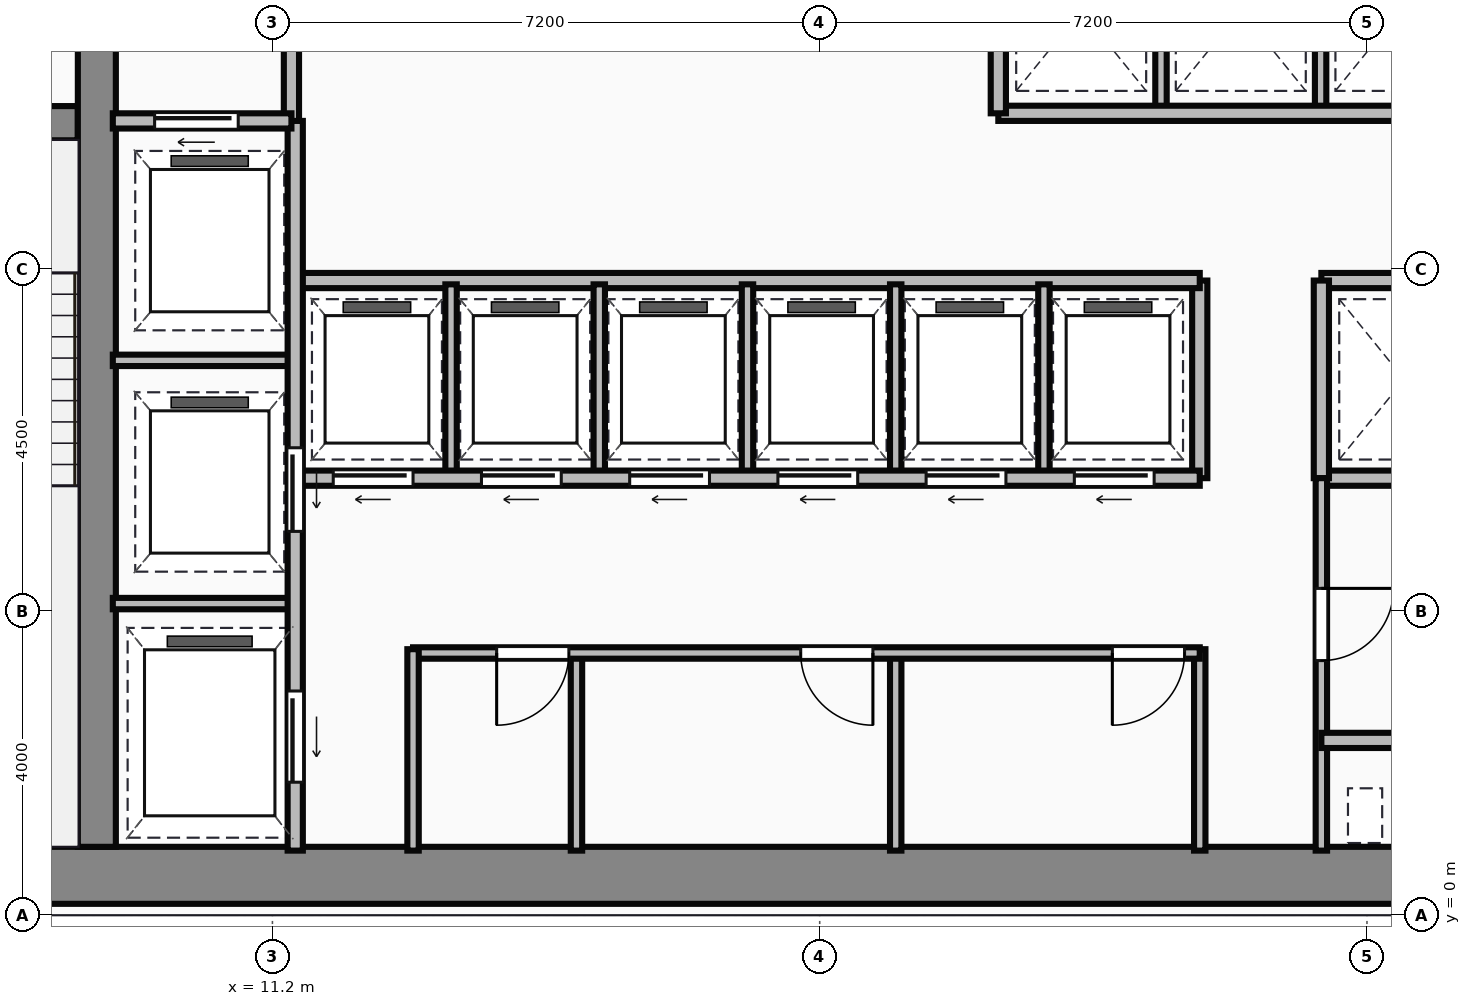
"""IFC4 building model, lengths in metres.
Left out: names, types, materials, properties, quantities, classifications, styles, units other than length and angle.
Written with IfcOpenShell. Run it as: python <this file> out.ifc"""

import sys

from ifc_helpers import new_model, si_unit, direction, frame, frame_2d, origin, place, context, subcontext, project, spatial, rectangle, extrude, source, transform, mapped, element, fill, save


model = new_model("IFC4")
c1 = context("Model", 3, precision=1e-05, world=origin(), true_north=direction((0.0, 1.0)))
c2 = subcontext(c1, "Body", "Model", "MODEL_VIEW")
j1 = project(units=[si_unit("LENGTHUNIT", "METRE"), si_unit("PLANEANGLEUNIT", "RADIAN")], contexts=[c1])
p1 = place(None, origin())
s1 = spatial("IfcSite", under=j1, at=p1, CompositionType="ELEMENT")
p2 = place(p1, origin())
s2 = spatial("IfcBuilding", under=s1, at=p2, CompositionType="ELEMENT")
p3 = place(p2, frame((0.0, 0.0, 99.6)))
s3 = spatial("IfcBuildingStorey", under=s2, at=p3, CompositionType="ELEMENT", Elevation=99.6)
m1 = source(origin(), c2, "Body", "SweptSolid", [
    extrude(rectangle(XDim=29.5, YDim=0.75, at=frame_2d((14.75, 0.0))), origin(), (0.0, 0.0, 1.0), 3.65),
])
p4 = place(p3, frame((4.5, 0.525, 0.0), z_axis=(0.0, 0.0, 1.0), x_axis=(1.0, 0.0, 0.0)))
e1 = element("IfcWall", 1, at=p4, inside=s3, PredefinedType="SHEAR", context=c2, shape_type="MappedRepresentation", body=[
    mapped(m1, transform((0.0, 0.0, 0.0))),
])
m2 = source(origin(), c2, "Body", "SweptSolid", [
    extrude(rectangle(XDim=12.35, YDim=0.5, at=frame_2d((6.175, 0.0))), origin(), (0.0, 0.0, 1.0), 3.65),
])
p5 = place(p3, frame((8.89, 0.9, 0.0), z_axis=(0.0, 0.0, 1.0), x_axis=(0.0, 1.0, 0.0)))
e2 = element("IfcWall", 2, at=p5, inside=s3, PredefinedType="SHEAR", context=c2, shape_type="MappedRepresentation", body=[
    mapped(m2, transform((0.0, 0.0, 0.0))),
])
m3 = source(origin(), c2, "Body", "SweptSolid", [
    extrude(rectangle(XDim=3.39, YDim=0.45, at=frame_2d((1.695, 0.0))), origin(), (0.0, 0.0, 1.0), 3.65),
])
p6 = place(p3, frame((5.25, 10.42, 0.0), z_axis=(0.0, 0.0, 1.0), x_axis=(1.0, 0.0, 0.0)))
e3 = element("IfcWall", 3, at=p6, inside=s3, PredefinedType="SHEAR", context=c2, shape_type="MappedRepresentation", body=[
    mapped(m3, transform((0.0, 0.0, 0.0))),
])
p7 = place(p6, frame((1.05, 0.0, 0.0)))
e4 = element("IfcOpeningElement", 4, at=p7, cuts=e3, PredefinedType="OPENING", context=c2, shape_type="SweptSolid", body=[
    extrude(rectangle(XDim=1.1, YDim=2.15, at=frame_2d((0.55, 1.075))), frame((0.0, 0.235, 0.0), z_axis=(0.0, -1.0, 0.0), x_axis=(1.0, 0.0, 0.0)), (0.0, 0.0, 1.0), 0.47),
])
m4 = source(origin(), c2, "Body", "SweptSolid", [
    extrude(rectangle(XDim=3.18, YDim=0.2, at=frame_2d((1.59, 0.0))), origin(), (0.0, 0.0, 1.0), 3.4),
])
p8 = place(p3, frame((11.45, 10.42, 0.0), z_axis=(0.0, 0.0, 1.0), x_axis=(0.0, 1.0, 0.0)))
e5 = element("IfcWall", 5, at=p8, inside=s3, PredefinedType="PARTITIONING", context=c2, shape_type="MappedRepresentation", body=[
    mapped(m4, transform((0.0, 0.0, 0.0))),
])
m5 = source(origin(), c2, "Body", "SweptSolid", [
    extrude(rectangle(XDim=2.35, YDim=0.2, at=frame_2d((1.175, 0.0))), origin(), (0.0, 0.0, 1.0), 3.4),
])
p9 = place(p3, frame((9.1, 10.45, 0.0), z_axis=(0.0, 0.0, 1.0), x_axis=(1.0, 0.0, 0.0)))
e6 = element("IfcWall", 6, at=p9, inside=s3, PredefinedType="PARTITIONING", context=c2, shape_type="MappedRepresentation", body=[
    mapped(m5, transform((0.0, 0.0, 0.0))),
])
p10 = place(p9, frame((0.55, 0.0, 0.0)))
e7 = element("IfcOpeningElement", 7, at=p10, cuts=e6, PredefinedType="OPENING", context=c2, shape_type="SweptSolid", body=[
    extrude(rectangle(XDim=1.1, YDim=2.15, at=frame_2d((0.55, 1.075))), frame((0.0, 0.11, 0.0), z_axis=(0.0, -1.0, 0.0), x_axis=(1.0, 0.0, 0.0)), (0.0, 0.0, 1.0), 0.22),
])
m6 = source(origin(), c2, "Body", "SweptSolid", [
    extrude(rectangle(XDim=9.6, YDim=0.2, at=frame_2d((4.8, 0.0))), origin(), (0.0, 0.0, 1.0), 3.4),
])
p11 = place(p3, frame((11.5, 0.85, 0.0), z_axis=(0.0, 0.0, 1.0), x_axis=(0.0, 1.0, 0.0)))
e8 = element("IfcWall", 8, at=p11, inside=s3, PredefinedType="PARTITIONING", context=c2, shape_type="MappedRepresentation", body=[
    mapped(m6, transform((0.0, 0.0, 0.0))),
])
p12 = place(p11, frame((4.2, 0.0, 0.0)))
e9 = element("IfcOpeningElement", 9, at=p12, cuts=e8, PredefinedType="OPENING", context=c2, shape_type="SweptSolid", body=[
    extrude(rectangle(XDim=1.1, YDim=2.15, at=frame_2d((0.55, 1.075))), frame((0.0, 0.11, 0.0), z_axis=(0.0, -1.0, 0.0), x_axis=(1.0, 0.0, 0.0)), (0.0, 0.0, 1.0), 0.22),
])
p13 = place(p11, frame((0.9, 0.0, 0.0)))
e10 = element("IfcOpeningElement", 10, at=p13, cuts=e8, PredefinedType="OPENING", context=c2, shape_type="SweptSolid", body=[
    extrude(rectangle(XDim=1.2, YDim=2.15, at=frame_2d((0.6, 1.075))), frame((0.0, 0.11, 0.0), z_axis=(0.0, -1.0, 0.0), x_axis=(1.0, 0.0, 0.0)), (0.0, 0.0, 1.0), 0.22),
])
m7 = source(origin(), c2, "Body", "SweptSolid", [
    extrude(rectangle(XDim=2.4, YDim=0.15, at=frame_2d((1.2, 0.0))), origin(), (0.0, 0.0, 1.0), 3.4),
])
for number, where, z_axis, x_axis in (
    (11, (9.1, 4.1, 0.0), (0.0, 0.0, 1.0), (1.0, 0.0, 0.0)),
    (12, (9.1, 7.3, 0.0), (0.0, 0.0, 1.0), (1.0, 0.0, 0.0)),
):
    element("IfcWall", number, at=place(p3, frame(where, z_axis=z_axis, x_axis=x_axis)), inside=s3, PredefinedType="PARTITIONING", context=c2, shape_type="MappedRepresentation", body=[
        mapped(m7, transform((0.0, 0.0, 0.0))),
    ])
m8 = source(origin(), c2, "Body", "SweptSolid", [
    extrude(rectangle(XDim=2.65, YDim=0.15, at=frame_2d((1.325, 0.0))), origin(), (0.0, 0.0, 1.0), 3.4),
])
p14 = place(p3, frame((13.05, 0.85, 0.0), z_axis=(0.0, 0.0, 1.0), x_axis=(0.0, 1.0, 0.0)))
e13 = element("IfcWall", 13, at=p14, inside=s3, PredefinedType="PARTITIONING", context=c2, shape_type="MappedRepresentation", body=[
    mapped(m8, transform((0.0, 0.0, 0.0))),
])
m9 = source(origin(), c2, "Body", "SweptSolid", [
    extrude(rectangle(XDim=10.35, YDim=0.15, at=frame_2d((5.175, 0.0))), origin(), (0.0, 0.0, 1.0), 3.4),
])
p15 = place(p3, frame((13.05, 3.45, 0.0), z_axis=(0.0, 0.0, 1.0), x_axis=(1.0, 0.0, 0.0)))
e14 = element("IfcWall", 14, at=p15, inside=s3, PredefinedType="PARTITIONING", context=c2, shape_type="MappedRepresentation", body=[
    mapped(m9, transform((0.0, 0.0, 0.0))),
])
p16 = place(p15, frame((1.1, 0.0, 0.0)))
e15 = element("IfcOpeningElement", 15, at=p16, cuts=e14, PredefinedType="OPENING", context=c2, shape_type="SweptSolid", body=[
    extrude(rectangle(XDim=0.95, YDim=2.15, at=frame_2d((0.475, 1.075))), frame((0.0, 0.085, 0.0), z_axis=(0.0, -1.0, 0.0), x_axis=(1.0, 0.0, 0.0)), (0.0, 0.0, 1.0), 0.17),
])
p17 = place(p15, frame((5.1, 0.0, 0.0)))
e16 = element("IfcOpeningElement", 16, at=p17, cuts=e14, PredefinedType="OPENING", context=c2, shape_type="SweptSolid", body=[
    extrude(rectangle(XDim=0.95, YDim=2.15, at=frame_2d((0.475, 1.075))), frame((0.0, 0.085, 0.0), z_axis=(0.0, -1.0, 0.0), x_axis=(1.0, 0.0, 0.0)), (0.0, 0.0, 1.0), 0.17),
])
p18 = place(p15, frame((9.2, 0.0, 0.0)))
e17 = element("IfcOpeningElement", 17, at=p18, cuts=e14, PredefinedType="OPENING", context=c2, shape_type="SweptSolid", body=[
    extrude(rectangle(XDim=0.95, YDim=2.15, at=frame_2d((0.475, 1.075))), frame((0.0, 0.085, 0.0), z_axis=(0.0, -1.0, 0.0), x_axis=(1.0, 0.0, 0.0)), (0.0, 0.0, 1.0), 0.17),
])
p19 = place(p3, frame((23.4, 0.85, 0.0), z_axis=(0.0, 0.0, 1.0), x_axis=(0.0, 1.0, 0.0)))
e18 = element("IfcWall", 18, at=p19, inside=s3, PredefinedType="PARTITIONING", context=c2, shape_type="MappedRepresentation", body=[
    mapped(m8, transform((0.0, 0.0, 0.0))),
])
m10 = source(origin(), c2, "Body", "SweptSolid", [
    extrude(rectangle(XDim=2.6, YDim=0.15, at=frame_2d((1.3, 0.0))), origin(), (0.0, 0.0, 1.0), 3.4),
])
for number, where, z_axis, x_axis in (
    (19, (15.2, 0.85, 0.0), (0.0, 0.0, 1.0), (0.0, 1.0, 0.0)),
    (20, (19.4, 0.85, 0.0), (0.0, 0.0, 1.0), (0.0, 1.0, 0.0)),
):
    element("IfcWall", number, at=place(p3, frame(where, z_axis=z_axis, x_axis=x_axis)), inside=s3, PredefinedType="PARTITIONING", context=c2, shape_type="MappedRepresentation", body=[
        mapped(m10, transform((0.0, 0.0, 0.0))),
    ])
m11 = source(origin(), c2, "Body", "SweptSolid", [
    extrude(rectangle(XDim=11.85, YDim=0.2, at=frame_2d((5.925, 0.0))), origin(), (0.0, 0.0, 1.0), 3.4),
])
p20 = place(p3, frame((11.55, 5.75, 0.0), z_axis=(0.0, 0.0, 1.0), x_axis=(1.0, 0.0, 0.0)))
e21 = element("IfcWall", 21, at=p20, inside=s3, PredefinedType="PARTITIONING", context=c2, shape_type="MappedRepresentation", body=[
    mapped(m11, transform((0.0, 0.0, 0.0))),
])
p21 = place(p20, frame((0.45, 0.0, 0.0)))
e22 = element("IfcOpeningElement", 22, at=p21, cuts=e21, PredefinedType="OPENING", context=c2, shape_type="SweptSolid", body=[
    extrude(rectangle(XDim=1.05, YDim=2.15, at=frame_2d((0.525, 1.075))), frame((0.0, 0.11, 0.0), z_axis=(0.0, -1.0, 0.0), x_axis=(1.0, 0.0, 0.0)), (0.0, 0.0, 1.0), 0.22),
])
p22 = place(p20, frame((2.4, 0.0, 0.0)))
e23 = element("IfcOpeningElement", 23, at=p22, cuts=e21, PredefinedType="OPENING", context=c2, shape_type="SweptSolid", body=[
    extrude(rectangle(XDim=1.05, YDim=2.15, at=frame_2d((0.525, 1.075))), frame((0.0, 0.11, 0.0), z_axis=(0.0, -1.0, 0.0), x_axis=(1.0, 0.0, 0.0)), (0.0, 0.0, 1.0), 0.22),
])
p23 = place(p20, frame((4.35, 0.0, 0.0)))
e24 = element("IfcOpeningElement", 24, at=p23, cuts=e21, PredefinedType="OPENING", context=c2, shape_type="SweptSolid", body=[
    extrude(rectangle(XDim=1.05, YDim=2.15, at=frame_2d((0.525, 1.075))), frame((0.0, 0.11, 0.0), z_axis=(0.0, -1.0, 0.0), x_axis=(1.0, 0.0, 0.0)), (0.0, 0.0, 1.0), 0.22),
])
p24 = place(p20, frame((6.3, 0.0, 0.0)))
e25 = element("IfcOpeningElement", 25, at=p24, cuts=e21, PredefinedType="OPENING", context=c2, shape_type="SweptSolid", body=[
    extrude(rectangle(XDim=1.05, YDim=2.15, at=frame_2d((0.525, 1.075))), frame((0.0, 0.11, 0.0), z_axis=(0.0, -1.0, 0.0), x_axis=(1.0, 0.0, 0.0)), (0.0, 0.0, 1.0), 0.22),
])
p25 = place(p20, frame((8.25, 0.0, 0.0)))
e26 = element("IfcOpeningElement", 26, at=p25, cuts=e21, PredefinedType="OPENING", context=c2, shape_type="SweptSolid", body=[
    extrude(rectangle(XDim=1.05, YDim=2.15, at=frame_2d((0.525, 1.075))), frame((0.0, 0.11, 0.0), z_axis=(0.0, -1.0, 0.0), x_axis=(1.0, 0.0, 0.0)), (0.0, 0.0, 1.0), 0.22),
])
p26 = place(p20, frame((10.2, 0.0, 0.0)))
e27 = element("IfcOpeningElement", 27, at=p26, cuts=e21, PredefinedType="OPENING", context=c2, shape_type="SweptSolid", body=[
    extrude(rectangle(XDim=1.05, YDim=2.15, at=frame_2d((0.525, 1.075))), frame((0.0, 0.11, 0.0), z_axis=(0.0, -1.0, 0.0), x_axis=(1.0, 0.0, 0.0)), (0.0, 0.0, 1.0), 0.22),
])
p27 = place(p3, frame((11.55, 8.35, 0.0), z_axis=(0.0, 0.0, 1.0), x_axis=(1.0, 0.0, 0.0)))
e28 = element("IfcWall", 28, at=p27, inside=s3, PredefinedType="PARTITIONING", context=c2, shape_type="MappedRepresentation", body=[
    mapped(m11, transform((0.0, 0.0, 0.0))),
])
m12 = source(origin(), c2, "Body", "SweptSolid", [
    extrude(rectangle(XDim=2.6, YDim=0.2, at=frame_2d((1.3, 0.0))), origin(), (0.0, 0.0, 1.0), 3.4),
])
p28 = place(p3, frame((23.4, 5.75, 0.0), z_axis=(0.0, 0.0, 1.0), x_axis=(0.0, 1.0, 0.0)))
e29 = element("IfcWall", 29, at=p28, inside=s3, PredefinedType="PARTITIONING", context=c2, shape_type="MappedRepresentation", body=[
    mapped(m12, transform((0.0, 0.0, 0.0))),
])
m13 = source(origin(), c2, "Body", "SweptSolid", [
    extrude(rectangle(XDim=2.5, YDim=0.15, at=frame_2d((1.25, 0.0))), origin(), (0.0, 0.0, 1.0), 3.4),
])
for number, where, z_axis, x_axis in (
    (30, (13.55, 5.8, 0.0), (0.0, 0.0, 1.0), (0.0, 1.0, 0.0)),
    (31, (15.5, 5.8, 0.0), (0.0, 0.0, 1.0), (0.0, 1.0, 0.0)),
    (32, (17.45, 5.8, 0.0), (0.0, 0.0, 1.0), (0.0, 1.0, 0.0)),
    (33, (19.4, 5.8, 0.0), (0.0, 0.0, 1.0), (0.0, 1.0, 0.0)),
    (34, (21.35, 5.8, 0.0), (0.0, 0.0, 1.0), (0.0, 1.0, 0.0)),
):
    element("IfcWall", number, at=place(p3, frame(where, z_axis=z_axis, x_axis=x_axis)), inside=s3, PredefinedType="PARTITIONING", context=c2, shape_type="MappedRepresentation", body=[
        mapped(m13, transform((0.0, 0.0, 0.0))),
    ])
m14 = source(origin(), c2, "Body", "SweptSolid", [
    extrude(rectangle(XDim=8.8, YDim=0.2, at=frame_2d((4.4, 0.0))), origin(), (0.0, 0.0, 1.0), 3.4),
])
p29 = place(p3, frame((20.75, 10.55, 0.0), z_axis=(0.0, 0.0, 1.0), x_axis=(1.0, 0.0, 0.0)))
e35 = element("IfcWall", 35, at=p29, inside=s3, PredefinedType="PARTITIONING", context=c2, shape_type="MappedRepresentation", body=[
    mapped(m14, transform((0.0, 0.0, 0.0))),
])
m15 = source(origin(), c2, "Body", "SweptSolid", [
    extrude(rectangle(XDim=3.0, YDim=0.2, at=frame_2d((1.5, 0.0))), origin(), (0.0, 0.0, 1.0), 3.4),
])
p30 = place(p3, frame((20.75, 10.55, 0.0), z_axis=(0.0, 0.0, 1.0), x_axis=(0.0, 1.0, 0.0)))
e36 = element("IfcWall", 36, at=p30, inside=s3, PredefinedType="PARTITIONING", context=c2, shape_type="MappedRepresentation", body=[
    mapped(m15, transform((0.0, 0.0, 0.0))),
])
m16 = source(origin(), c2, "Body", "SweptSolid", [
    extrude(rectangle(XDim=2.85, YDim=0.15, at=frame_2d((1.425, 0.0))), origin(), (0.0, 0.0, 1.0), 3.4),
])
for number, where, z_axis, x_axis in (
    (37, (22.89, 10.6, 0.0), (0.0, 0.0, 1.0), (0.0, 1.0, 0.0)),
    (38, (24.99, 10.6, 0.0), (0.0, 0.0, 1.0), (0.0, 1.0, 0.0)),
):
    element("IfcWall", number, at=place(p3, frame(where, z_axis=z_axis, x_axis=x_axis)), inside=s3, PredefinedType="PARTITIONING", context=c2, shape_type="MappedRepresentation", body=[
        mapped(m16, transform((0.0, 0.0, 0.0))),
    ])
m17 = source(origin(), c2, "Body", "SweptSolid", [
    extrude(rectangle(XDim=4.55, YDim=0.2, at=frame_2d((2.275, 0.0))), origin(), (0.0, 0.0, 1.0), 3.4),
])
for number, where, z_axis, x_axis in (
    (39, (25.0, 8.35, 0.0), (0.0, 0.0, 1.0), (1.0, 0.0, 0.0)),
    (40, (25.0, 5.75, 0.0), (0.0, 0.0, 1.0), (1.0, 0.0, 0.0)),
):
    element("IfcWall", number, at=place(p3, frame(where, z_axis=z_axis, x_axis=x_axis)), inside=s3, PredefinedType="PARTITIONING", context=c2, shape_type="MappedRepresentation", body=[
        mapped(m17, transform((0.0, 0.0, 0.0))),
    ])
p31 = place(p3, frame((25.0, 5.75, 0.0), z_axis=(0.0, 0.0, 1.0), x_axis=(0.0, 1.0, 0.0)))
e41 = element("IfcWall", 41, at=p31, inside=s3, PredefinedType="PARTITIONING", context=c2, shape_type="MappedRepresentation", body=[
    mapped(m12, transform((0.0, 0.0, 0.0))),
])
m18 = source(origin(), c2, "Body", "SweptSolid", [
    extrude(rectangle(XDim=4.9, YDim=0.15, at=frame_2d((2.45, 0.0))), origin(), (0.0, 0.0, 1.0), 3.4),
])
p32 = place(p3, frame((25.0, 0.85, 0.0), z_axis=(0.0, 0.0, 1.0), x_axis=(0.0, 1.0, 0.0)))
e42 = element("IfcWall", 42, at=p32, inside=s3, PredefinedType="PARTITIONING", context=c2, shape_type="MappedRepresentation", body=[
    mapped(m18, transform((0.0, 0.0, 0.0))),
])
p33 = place(p32, frame((2.5, 0.0, 0.0)))
e43 = element("IfcOpeningElement", 43, at=p33, cuts=e42, PredefinedType="OPENING", context=c2, shape_type="SweptSolid", body=[
    extrude(rectangle(XDim=0.95, YDim=2.15, at=frame_2d((0.475, 1.075))), frame((0.0, 0.085, 0.0), z_axis=(0.0, -1.0, 0.0), x_axis=(1.0, 0.0, 0.0)), (0.0, 0.0, 1.0), 0.17),
])
m19 = source(origin(), c2, "Body", "SweptSolid", [
    extrude(rectangle(XDim=2.4, YDim=0.2, at=frame_2d((1.2, 0.0))), origin(), (0.0, 0.0, 1.0), 3.4),
])
p34 = place(p3, frame((25.0, 2.3, 0.0), z_axis=(0.0, 0.0, 1.0), x_axis=(1.0, 0.0, 0.0)))
e44 = element("IfcWall", 44, at=p34, inside=s3, PredefinedType="PARTITIONING", context=c2, shape_type="MappedRepresentation", body=[
    mapped(m19, transform((0.0, 0.0, 0.0))),
])
m20 = source(origin(), c2, "Body", "SweptSolid", [
    extrude(rectangle(XDim=1.1, YDim=2.15, at=frame_2d((0.55, 1.075))), frame((0.0, 0.025, 0.0), z_axis=(0.0, -1.0, 0.0), x_axis=(1.0, 0.0, 0.0)), (0.0, 0.0, 1.0), 0.05),
])
p35 = place(p10, origin())
e45 = element("IfcDoor", 45, at=p35, inside=s3, OperationType="SLIDING_TO_LEFT", PredefinedType="DOOR", context=c2, shape_type="MappedRepresentation", body=[
    mapped(m20, transform((0.0, 0.0, 0.0))),
])
fill(e7, e45)
p36 = place(p12, frame((1.1, 0.0, 0.0), z_axis=(0.0, 0.0, 1.0), x_axis=(-1.0, 0.0, 0.0)))
e46 = element("IfcDoor", 46, at=p36, inside=s3, OperationType="SLIDING_TO_LEFT", PredefinedType="DOOR", context=c2, shape_type="MappedRepresentation", body=[
    mapped(m20, transform((0.0, 0.0, 0.0))),
])
fill(e9, e46)
m21 = source(origin(), c2, "Body", "SweptSolid", [
    extrude(rectangle(XDim=1.2, YDim=2.15, at=frame_2d((0.6, 1.075))), frame((0.0, 0.025, 0.0), z_axis=(0.0, -1.0, 0.0), x_axis=(1.0, 0.0, 0.0)), (0.0, 0.0, 1.0), 0.05),
])
p37 = place(p13, frame((1.2, 0.0, 0.0), z_axis=(0.0, 0.0, 1.0), x_axis=(-1.0, 0.0, 0.0)))
e47 = element("IfcDoor", 47, at=p37, inside=s3, OperationType="SLIDING_TO_LEFT", PredefinedType="DOOR", context=c2, shape_type="MappedRepresentation", body=[
    mapped(m21, transform((0.0, 0.0, 0.0))),
])
fill(e10, e47)
m22 = source(origin(), c2, "Body", "SweptSolid", [
    extrude(rectangle(XDim=0.95, YDim=2.15, at=frame_2d((0.475, 1.075))), frame((0.0, 0.025, 0.0), z_axis=(0.0, -1.0, 0.0), x_axis=(1.0, 0.0, 0.0)), (0.0, 0.0, 1.0), 0.05),
])
p38 = place(p16, origin())
e48 = element("IfcDoor", 48, at=p38, inside=s3, OperationType="SINGLE_SWING_LEFT", PredefinedType="DOOR", context=c2, shape_type="MappedRepresentation", body=[
    mapped(m22, transform((0.0, 0.0, 0.0))),
])
fill(e15, e48)
p39 = place(p17, origin())
e49 = element("IfcDoor", 49, at=p39, inside=s3, OperationType="SINGLE_SWING_RIGHT", PredefinedType="DOOR", context=c2, shape_type="MappedRepresentation", body=[
    mapped(m22, transform((0.0, 0.0, 0.0))),
])
fill(e16, e49)
p40 = place(p18, origin())
e50 = element("IfcDoor", 50, at=p40, inside=s3, OperationType="SINGLE_SWING_LEFT", PredefinedType="DOOR", context=c2, shape_type="MappedRepresentation", body=[
    mapped(m22, transform((0.0, 0.0, 0.0))),
])
fill(e17, e50)
m23 = source(origin(), c2, "Body", "SweptSolid", [
    extrude(rectangle(XDim=1.05, YDim=2.15, at=frame_2d((0.525, 1.075))), frame((0.0, 0.025, 0.0), z_axis=(0.0, -1.0, 0.0), x_axis=(1.0, 0.0, 0.0)), (0.0, 0.0, 1.0), 0.05),
])
p41 = place(p21, frame((1.05, 0.0, 0.0), z_axis=(0.0, 0.0, 1.0), x_axis=(-1.0, 0.0, 0.0)))
e51 = element("IfcDoor", 51, at=p41, inside=s3, OperationType="SLIDING_TO_LEFT", PredefinedType="DOOR", context=c2, shape_type="MappedRepresentation", body=[
    mapped(m23, transform((0.0, 0.0, 0.0))),
])
fill(e22, e51)
p42 = place(p22, frame((1.05, 0.0, 0.0), z_axis=(0.0, 0.0, 1.0), x_axis=(-1.0, 0.0, 0.0)))
e52 = element("IfcDoor", 52, at=p42, inside=s3, OperationType="SLIDING_TO_LEFT", PredefinedType="DOOR", context=c2, shape_type="MappedRepresentation", body=[
    mapped(m23, transform((0.0, 0.0, 0.0))),
])
fill(e23, e52)
p43 = place(p23, frame((1.05, 0.0, 0.0), z_axis=(0.0, 0.0, 1.0), x_axis=(-1.0, 0.0, 0.0)))
e53 = element("IfcDoor", 53, at=p43, inside=s3, OperationType="SLIDING_TO_LEFT", PredefinedType="DOOR", context=c2, shape_type="MappedRepresentation", body=[
    mapped(m23, transform((0.0, 0.0, 0.0))),
])
fill(e24, e53)
p44 = place(p24, frame((1.05, 0.0, 0.0), z_axis=(0.0, 0.0, 1.0), x_axis=(-1.0, 0.0, 0.0)))
e54 = element("IfcDoor", 54, at=p44, inside=s3, OperationType="SLIDING_TO_LEFT", PredefinedType="DOOR", context=c2, shape_type="MappedRepresentation", body=[
    mapped(m23, transform((0.0, 0.0, 0.0))),
])
fill(e25, e54)
p45 = place(p25, frame((1.05, 0.0, 0.0), z_axis=(0.0, 0.0, 1.0), x_axis=(-1.0, 0.0, 0.0)))
e55 = element("IfcDoor", 55, at=p45, inside=s3, OperationType="SLIDING_TO_LEFT", PredefinedType="DOOR", context=c2, shape_type="MappedRepresentation", body=[
    mapped(m23, transform((0.0, 0.0, 0.0))),
])
fill(e26, e55)
p46 = place(p26, frame((1.05, 0.0, 0.0), z_axis=(0.0, 0.0, 1.0), x_axis=(-1.0, 0.0, 0.0)))
e56 = element("IfcDoor", 56, at=p46, inside=s3, OperationType="SLIDING_TO_LEFT", PredefinedType="DOOR", context=c2, shape_type="MappedRepresentation", body=[
    mapped(m23, transform((0.0, 0.0, 0.0))),
])
fill(e27, e56)
p47 = place(p33, origin())
e57 = element("IfcDoor", 57, at=p47, inside=s3, OperationType="SINGLE_SWING_RIGHT", PredefinedType="DOOR", context=c2, shape_type="MappedRepresentation", body=[
    mapped(m22, transform((0.0, 0.0, 0.0))),
])
fill(e43, e57)
save(model, sys.argv[1])
